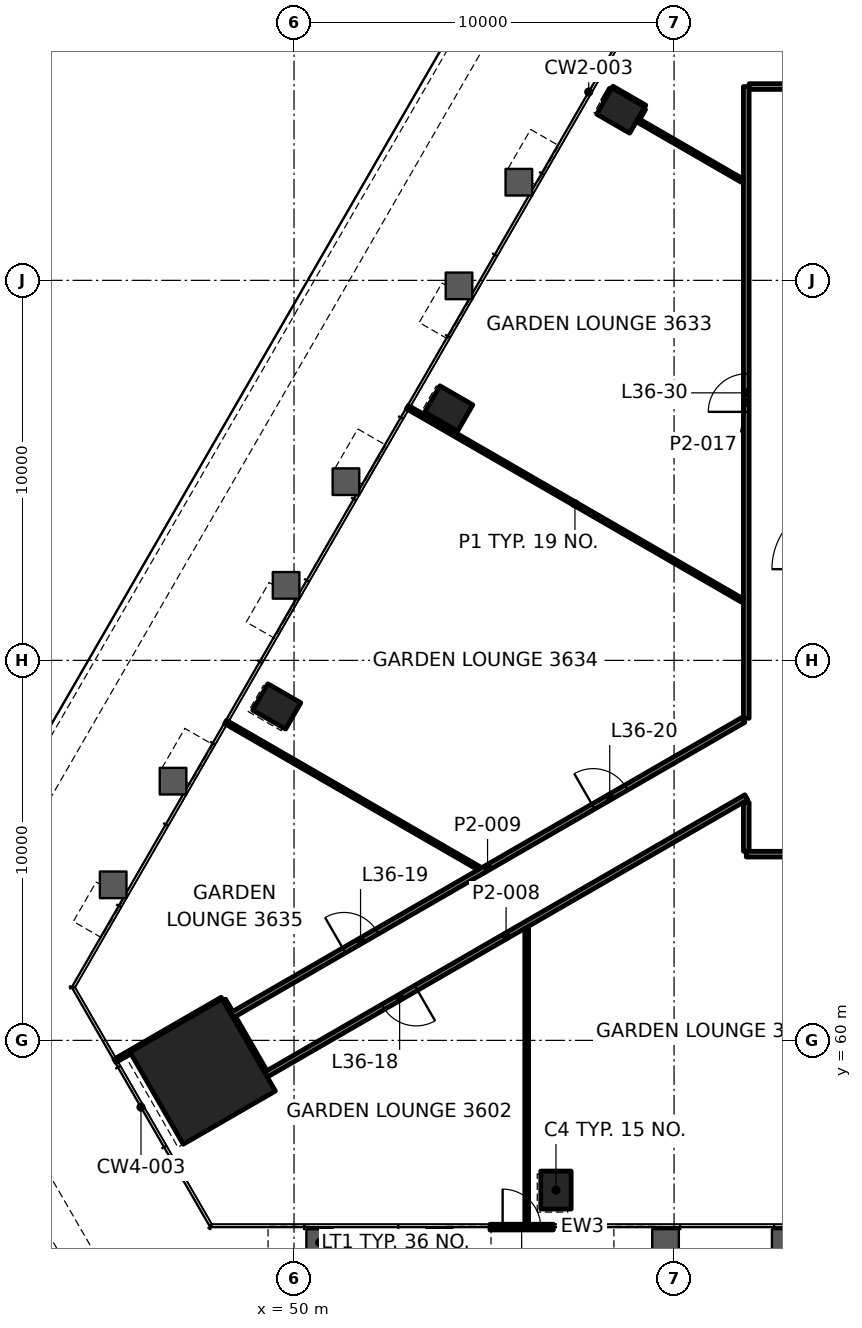
"""IFC4 building model, lengths in metres.
Left out: names, types, materials, properties, quantities, classifications, styles, units other than length and angle.
Written with IfcOpenShell. Run it as: python <this file> out.ifc"""

import sys

from ifc_helpers import new_model, si_unit, direction, frame, frame_2d, origin, origin_2d, place, context, subcontext, project, spatial, rectangle, hollow_rectangle, extrude, element, fill, save


model = new_model("IFC4")
c1 = context("Model", 3, precision=1e-05, world=origin(), true_north=direction((0.0, 1.0)))
c2 = subcontext(c1, "Body", "Model", "MODEL_VIEW")
j1 = project(units=[si_unit("LENGTHUNIT", "METRE"), si_unit("PLANEANGLEUNIT", "RADIAN")], contexts=[c1])
p1 = place(None, origin())
s1 = spatial("IfcSite", under=j1, at=p1, CompositionType="ELEMENT")
p2 = place(p1, origin())
s2 = spatial("IfcBuilding", under=s1, at=p2, CompositionType="ELEMENT")
p3 = place(p2, frame((0.0, 0.0, 159.7)))
s3 = spatial("IfcBuildingStorey", under=s2, at=p3, CompositionType="ELEMENT", Elevation=159.7)
p4 = place(p3, frame((47.597, 59.179, 0.0), z_axis=(0.0, 0.0, 1.0), x_axis=(0.5, -0.866025403784, 0.0)))
e1 = element("IfcColumn", 1, at=p4, inside=s3, PredefinedType="COLUMN", context=c2, shape_type="SweptSolid", body=[
    extrude(rectangle(XDim=2.8, YDim=2.8, at=origin_2d()), origin(), (0.0, 0.0, 1.0), 3.9),
])
for number, where, z_axis, x_axis in (
    (2, (56.892, 56.061, -0.0), (0.0, 0.0, 1.0), (1.0, 0.0, 0.0)),
    (3, (58.598, 84.469, -0.0), (0.0, 0.0, 1.0), (-0.5, -0.866, 0.0)),
    (4, (54.072, 76.628, -0.0), (0.0, 0.0, 1.0), (-0.5, -0.866, 0.0)),
    (5, (49.544, 68.788, -0.0), (0.0, 0.0, 1.0), (-0.5, -0.866, 0.0)),
):
    element("IfcColumn", number, at=place(p3, frame(where, z_axis=z_axis, x_axis=x_axis)), inside=s3, PredefinedType="COLUMN", context=c2, shape_type="SweptSolid", body=[
        extrude(hollow_rectangle(XDim=0.8, YDim=1.0, WallThickness=0.05, at=origin_2d()), origin(), (0.0, 0.0, 1.0), 3.9),
    ])
p5 = place(p3, frame((88.1, 64.9, 0.0), z_axis=(0.0, 0.0, 1.0), x_axis=(-1.0, 0.0, 0.0)))
e6 = element("IfcWall", 6, at=p5, inside=s3, PredefinedType="PARTITIONING", context=c2, shape_type="SweptSolid", body=[
    extrude(rectangle(XDim=26.199, YDim=0.15, at=frame_2d((13.1, 0.0))), origin(), (0.0, 0.0, 1.0), 3.1),
])
p6 = place(p5, frame((0.322, 0.0, 0.0)))
e7 = element("IfcOpeningElement", 7, at=p6, cuts=e6, PredefinedType="OPENING", context=c2, shape_type="SweptSolid", body=[
    extrude(rectangle(XDim=1.0, YDim=2.1, at=frame_2d((0.5, 1.05))), frame((0.0, 0.085, 0.0), z_axis=(0.0, -1.0, 0.0), x_axis=(1.0, 0.0, 0.0)), (0.0, 0.0, 1.0), 0.17),
])
p7 = place(p5, frame((5.859, 0.0, 0.0)))
e8 = element("IfcOpeningElement", 8, at=p7, cuts=e6, PredefinedType="OPENING", context=c2, shape_type="SweptSolid", body=[
    extrude(rectangle(XDim=0.9, YDim=2.1, at=frame_2d((0.45, 1.05))), frame((0.0, 0.085, 0.0), z_axis=(0.0, -1.0, 0.0), x_axis=(1.0, 0.0, 0.0)), (0.0, 0.0, 1.0), 0.17),
])
p8 = place(p5, frame((8.981, 0.0, 0.0)))
e9 = element("IfcOpeningElement", 9, at=p8, cuts=e6, PredefinedType="OPENING", context=c2, shape_type="SweptSolid", body=[
    extrude(rectangle(XDim=1.0, YDim=2.1, at=frame_2d((0.5, 1.05))), frame((0.0, 0.085, 0.0), z_axis=(0.0, -1.0, 0.0), x_axis=(1.0, 0.0, 0.0)), (0.0, 0.0, 1.0), 0.17),
])
p9 = place(p5, frame((16.611, 0.0, 0.0)))
e10 = element("IfcOpeningElement", 10, at=p9, cuts=e6, PredefinedType="OPENING", context=c2, shape_type="SweptSolid", body=[
    extrude(rectangle(XDim=0.9, YDim=2.1, at=frame_2d((0.45, 1.05))), frame((0.0, 0.085, 0.0), z_axis=(0.0, -1.0, 0.0), x_axis=(1.0, 0.0, 0.0)), (0.0, 0.0, 1.0), 0.17),
])
p10 = place(p5, frame((20.006, 0.0, 0.0)))
e11 = element("IfcOpeningElement", 11, at=p10, cuts=e6, PredefinedType="OPENING", context=c2, shape_type="SweptSolid", body=[
    extrude(rectangle(XDim=0.9, YDim=2.1, at=frame_2d((0.45, 1.05))), frame((0.0, 0.085, 0.0), z_axis=(0.0, -1.0, 0.0), x_axis=(1.0, 0.0, 0.0)), (0.0, 0.0, 1.0), 0.17),
])
p11 = place(p5, frame((23.575, 0.0, 0.0)))
e12 = element("IfcOpeningElement", 12, at=p11, cuts=e6, PredefinedType="OPENING", context=c2, shape_type="SweptSolid", body=[
    extrude(rectangle(XDim=1.0, YDim=2.1, at=frame_2d((0.5, 1.05))), frame((0.0, 0.085, 0.0), z_axis=(0.0, -1.0, 0.0), x_axis=(1.0, 0.0, 0.0)), (0.0, 0.0, 1.0), 0.17),
])
p12 = place(p3, frame((61.976, 85.1, 0.0), z_axis=(0.0, 0.0, 1.0), x_axis=(1.0, 0.0, 0.0)))
e13 = element("IfcWall", 13, at=p12, inside=s3, PredefinedType="PARTITIONING", context=c2, shape_type="SweptSolid", body=[
    extrude(rectangle(XDim=7.958, YDim=0.15, at=frame_2d((3.979, 0.0))), origin(), (0.0, 0.0, 1.0), 3.1),
])
p13 = place(p12, frame((3.479, 0.0, 0.0)))
e14 = element("IfcOpeningElement", 14, at=p13, cuts=e13, PredefinedType="OPENING", context=c2, shape_type="SweptSolid", body=[
    extrude(rectangle(XDim=1.0, YDim=2.1, at=frame_2d((0.5, 1.05))), frame((0.0, 0.085, 0.0), z_axis=(0.0, -1.0, 0.0), x_axis=(1.0, 0.0, 0.0)), (0.0, 0.0, 1.0), 0.17),
])
p14 = place(p3, frame((61.9, 66.397, 0.0), z_axis=(0.0, 0.0, 1.0), x_axis=(-0.86603071172, -0.499990806274, 0.0)))
e15 = element("IfcWall", 15, at=p14, inside=s3, PredefinedType="PARTITIONING", context=c2, shape_type="SweptSolid", body=[
    extrude(rectangle(XDim=14.595, YDim=0.15, at=frame_2d((7.298, 0.0))), origin(), (0.0, 0.0, 1.0), 2.947),
])
p15 = place(p14, frame((10.032, 0.0, 0.0)))
e16 = element("IfcOpeningElement", 16, at=p15, cuts=e15, PredefinedType="OPENING", context=c2, shape_type="SweptSolid", body=[
    extrude(rectangle(XDim=1.0, YDim=2.1, at=frame_2d((0.5, 1.05))), frame((0.0, 0.085, 0.0), z_axis=(0.0, -1.0, 0.0), x_axis=(1.0, 0.0, 0.0)), (0.0, 0.0, 1.0), 0.17),
])
p16 = place(p3, frame((48.36, 60.659, 0.0), z_axis=(0.0, 0.0, 1.0), x_axis=(0.866033404619, 0.499986141892, 0.0)))
e17 = element("IfcWall", 17, at=p16, inside=s3, PredefinedType="PARTITIONING", context=c2, shape_type="SweptSolid", body=[
    extrude(rectangle(XDim=15.548, YDim=0.15, at=frame_2d((7.774, 0.0))), origin(), (0.0, 0.0, 1.0), 3.1),
])
p17 = place(p16, frame((3.415, 0.0, 0.0)))
e18 = element("IfcOpeningElement", 18, at=p17, cuts=e17, PredefinedType="OPENING", context=c2, shape_type="SweptSolid", body=[
    extrude(rectangle(XDim=1.0, YDim=2.1, at=frame_2d((0.5, 1.05))), frame((0.0, 0.085, 0.0), z_axis=(0.0, -1.0, 0.0), x_axis=(1.0, 0.0, 0.0)), (0.0, 0.0, 1.0), 0.17),
])
p18 = place(p16, frame((10.986, 0.0, 0.0)))
e19 = element("IfcOpeningElement", 19, at=p18, cuts=e17, PredefinedType="OPENING", context=c2, shape_type="SweptSolid", body=[
    extrude(rectangle(XDim=1.0, YDim=2.1, at=frame_2d((0.5, 1.05))), frame((0.0, 0.085, 0.0), z_axis=(0.0, -1.0, 0.0), x_axis=(1.0, 0.0, 0.0)), (0.0, 0.0, 1.0), 0.17),
])
p19 = place(p3, frame((45.286, 59.461, 0.0), z_axis=(0.0, 0.0, 1.0), x_axis=(0.866035906198, 0.499981808845, 0.0)))
e20 = element("IfcWall", 20, at=p19, inside=s3, PredefinedType="PARTITIONING", context=c2, shape_type="SweptSolid", body=[
    extrude(rectangle(XDim=3.259, YDim=0.1, at=frame_2d((1.63, 0.0))), origin(), (0.0, 0.0, 1.0), 3.1),
])
p20 = place(p3, frame((59.057, 84.263, 0.0), z_axis=(0.0, 0.0, 1.0), x_axis=(0.500264001326, 0.865872928886, 0.0)))
e21 = element("IfcWall", 21, at=p20, inside=s3, PredefinedType="PARTITIONING", context=c2, shape_type="SweptSolid", body=[
    extrude(rectangle(XDim=0.299, YDim=0.1, at=frame_2d((0.149, 0.0))), origin(), (0.0, 0.0, 1.0), 3.1),
])
p21 = place(p3, frame((58.166, 84.72, 0.0), z_axis=(0.0, 0.0, 1.0), x_axis=(0.499601298118, 0.866255472086, 0.0)))
e22 = element("IfcWall", 22, at=p21, inside=s3, PredefinedType="PARTITIONING", context=c2, shape_type="SweptSolid", body=[
    extrude(rectangle(XDim=0.349, YDim=0.1, at=frame_2d((0.174, 0.0))), origin(), (0.0, 0.0, 1.0), 3.1),
])
p22 = place(p3, frame((61.9, 64.976, 0.0), z_axis=(0.0, 0.0, 1.0), x_axis=(0.0, 1.0, 0.0)))
e23 = element("IfcWall", 23, at=p22, inside=s3, PredefinedType="PARTITIONING", context=c2, shape_type="SweptSolid", body=[
    extrude(rectangle(XDim=1.285, YDim=0.15, at=frame_2d((0.643, 0.0))), origin(), (0.0, 0.0, 1.0), 2.947),
])
p23 = place(p3, frame((61.9, 68.476, 0.0), z_axis=(0.0, 0.0, 1.0), x_axis=(0.0, 1.0, 0.0)))
e24 = element("IfcWall", 24, at=p23, inside=s3, PredefinedType="PARTITIONING", context=c2, shape_type="SweptSolid", body=[
    extrude(rectangle(XDim=16.624, YDim=0.15, at=frame_2d((8.312, 0.0))), origin(), (0.0, 0.0, 1.0), 3.1),
])
p24 = place(p23, frame((8.064, 0.0, 0.0)))
e25 = element("IfcOpeningElement", 25, at=p24, cuts=e24, PredefinedType="OPENING", context=c2, shape_type="SweptSolid", body=[
    extrude(rectangle(XDim=1.0, YDim=2.1, at=frame_2d((0.5, 1.05))), frame((0.0, 0.085, 0.0), z_axis=(0.0, -1.0, 0.0), x_axis=(1.0, 0.0, 0.0)), (0.0, 0.0, 1.0), 0.17),
])
p25 = place(p3, frame((56.122, 55.118, 0.0), z_axis=(0.0, 0.0, 1.0), x_axis=(0.0, 1.0, 0.0)))
e26 = element("IfcWall", 26, at=p25, inside=s3, PredefinedType="PARTITIONING", context=c2, shape_type="SweptSolid", body=[
    extrude(rectangle(XDim=7.827, YDim=0.1, at=frame_2d((3.913, 0.0))), origin(), (0.0, 0.0, 1.0), 3.1),
])
p26 = place(p3, frame((49.222, 59.165, 0.0), z_axis=(0.0, 0.0, 1.0), x_axis=(-0.499991515992, 0.866030301974, 0.0)))
e27 = element("IfcWall", 27, at=p26, inside=s3, PredefinedType="PARTITIONING", context=c2, shape_type="SweptSolid", body=[
    extrude(rectangle(XDim=1.649, YDim=0.15, at=frame_2d((0.825, 0.0))), origin(), (0.0, 0.0, 1.0), 2.947),
])
p27 = place(p3, frame((59.231, 84.566, 0.0), z_axis=(0.0, 0.0, 1.0), x_axis=(-0.866039090965, 0.499976292358, 0.0)))
e28 = element("IfcWall", 28, at=p27, inside=s3, PredefinedType="PARTITIONING", context=c2, shape_type="SweptSolid", body=[
    extrude(rectangle(XDim=0.999, YDim=0.1, at=frame_2d((0.5, 0.0))), origin(), (0.0, 0.0, 1.0), 2.865),
])
p28 = place(p3, frame((61.799, 82.622, 0.0), z_axis=(0.0, 0.0, 1.0), x_axis=(-0.866015079179, 0.500017882314, 0.0)))
e29 = element("IfcWall", 29, at=p28, inside=s3, PredefinedType="PARTITIONING", context=c2, shape_type="SweptSolid", body=[
    extrude(rectangle(XDim=3.195, YDim=0.1, at=frame_2d((1.598, 0.0))), origin(), (0.0, 0.0, 1.0), 3.1),
])
p29 = place(p3, frame((61.799, 71.574, 0.0), z_axis=(0.0, 0.0, 1.0), x_axis=(-0.866020635606, 0.500008258637, 0.0)))
e30 = element("IfcWall", 30, at=p29, inside=s3, PredefinedType="PARTITIONING", context=c2, shape_type="SweptSolid", body=[
    extrude(rectangle(XDim=10.179, YDim=0.1, at=frame_2d((5.09, 0.0))), origin(), (0.0, 0.0, 1.0), 2.865),
])
p30 = place(p3, frame((54.864, 64.53, 0.0), z_axis=(0.0, 0.0, 1.0), x_axis=(-0.86601864019, 0.500011714706, 0.0)))
e31 = element("IfcWall", 31, at=p30, inside=s3, PredefinedType="PARTITIONING", context=c2, shape_type="SweptSolid", body=[
    extrude(rectangle(XDim=7.696, YDim=0.1, at=frame_2d((3.848, 0.0))), origin(), (0.0, 0.0, 1.0), 3.1),
])
p31 = place(p3, frame((48.322, 60.723, 0.0), z_axis=(0.0, 0.0, 1.0), x_axis=(-0.499854089722, 0.866109628736, 0.0)))
e32 = element("IfcWall", 32, at=p31, inside=s3, PredefinedType="PARTITIONING", context=c2, shape_type="SweptSolid", body=[
    extrude(rectangle(XDim=0.375, YDim=0.15, at=frame_2d((0.187, 0.0))), origin(), (0.0, 0.0, 1.0), 3.1),
])
p32 = place(p3, frame((69.117, 111.388, 0.0), z_axis=(0.0, 0.0, 1.0), x_axis=(-0.49999896751, -0.866025999892, 0.0)))
e33 = element("IfcWall", 33, at=p32, inside=s3, PredefinedType="SOLIDWALL", context=c2, shape_type="SweptSolid", body=[
    extrude(rectangle(XDim=57.143, YDim=0.8, at=frame_2d((28.571, 0.0))), origin(), (0.0, 0.0, 1.0), 0.9),
])
p33 = place(p3, frame((40.546, 60.892, 0.0), z_axis=(0.0, 0.0, 1.0), x_axis=(0.49999175339, -0.866030164915, 0.0)))
e34 = element("IfcWall", 34, at=p33, inside=s3, PredefinedType="SOLIDWALL", context=c2, shape_type="SweptSolid", body=[
    extrude(rectangle(XDim=10.019, YDim=0.8, at=frame_2d((5.009, 0.0))), origin(), (0.0, 0.0, 1.0), 0.9),
])
p34 = place(p15, origin())
e35 = element("IfcDoor", 35, at=p34, inside=s3, OperationType="SINGLE_SWING_RIGHT", PredefinedType="DOOR", context=c2, shape_type="SweptSolid", body=[
    extrude(rectangle(XDim=1.0, YDim=2.1, at=frame_2d((0.5, 1.05))), frame((0.0, 0.025, 0.0), z_axis=(0.0, -1.0, 0.0), x_axis=(1.0, 0.0, 0.0)), (0.0, 0.0, 1.0), 0.05),
])
fill(e16, e35)
p35 = place(p17, origin())
e36 = element("IfcDoor", 36, at=p35, inside=s3, OperationType="SINGLE_SWING_RIGHT", PredefinedType="DOOR", context=c2, shape_type="SweptSolid", body=[
    extrude(rectangle(XDim=1.0, YDim=2.1, at=frame_2d((0.5, 1.05))), frame((0.0, 0.025, 0.0), z_axis=(0.0, -1.0, 0.0), x_axis=(1.0, 0.0, 0.0)), (0.0, 0.0, 1.0), 0.05),
])
fill(e18, e36)
p36 = place(p18, origin())
e37 = element("IfcDoor", 37, at=p36, inside=s3, OperationType="SINGLE_SWING_LEFT", PredefinedType="DOOR", context=c2, shape_type="SweptSolid", body=[
    extrude(rectangle(XDim=1.0, YDim=2.1, at=frame_2d((0.5, 1.05))), frame((0.0, 0.025, 0.0), z_axis=(0.0, -1.0, 0.0), x_axis=(1.0, 0.0, 0.0)), (0.0, 0.0, 1.0), 0.05),
])
fill(e19, e37)
p37 = place(p24, origin())
e38 = element("IfcDoor", 38, at=p37, inside=s3, OperationType="SINGLE_SWING_RIGHT", PredefinedType="DOOR", context=c2, shape_type="SweptSolid", body=[
    extrude(rectangle(XDim=1.0, YDim=2.1, at=frame_2d((0.5, 1.05))), frame((0.0, 0.025, 0.0), z_axis=(0.0, -1.0, 0.0), x_axis=(1.0, 0.0, 0.0)), (0.0, 0.0, 1.0), 0.05),
])
fill(e25, e38)
p38 = place(p3, frame((55.155, 55.086, 0.0), z_axis=(0.0, 0.0, 1.0), x_axis=(1.0, 0.0, 0.0)))
p39 = place(p38, frame((0.334, 0.0, 0.0)))
p40 = place(p39, origin())
e39 = element("IfcDoor", 39, at=p40, inside=s3, OperationType="SINGLE_SWING_RIGHT", PredefinedType="DOOR", context=c2, shape_type="SweptSolid", body=[
    extrude(rectangle(XDim=1.0, YDim=2.1, at=frame_2d((0.5, 1.05))), frame((0.0, 0.025, 0.0), z_axis=(0.0, -1.0, 0.0), x_axis=(1.0, 0.0, 0.0)), (0.0, 0.0, 1.0), 0.05),
])
save(model, sys.argv[1])
